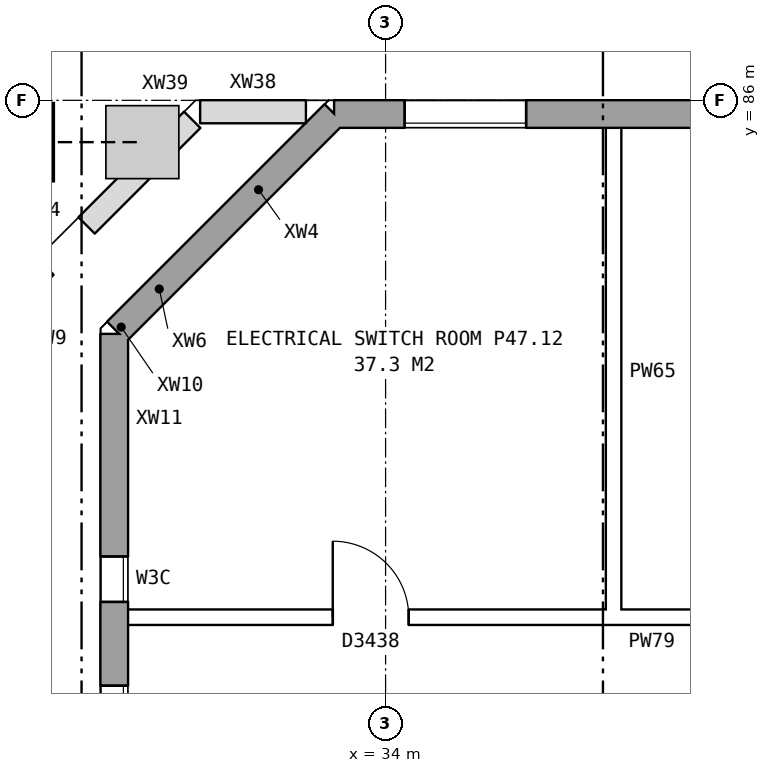
"""IFC4 building model, lengths in metres.
Left out: names, types, materials, properties, quantities, classifications, styles, units other than length and angle.
Written with IfcOpenShell. Run it as: python <this file> out.ifc"""

import sys

from ifc_helpers import new_model, si_unit, direction, frame, frame_2d, origin, origin_2d, place, context, subcontext, project, spatial, rectangle, hollow_rectangle, extrude, element, fill, save


model = new_model("IFC4")
c1 = context("Model", 3, precision=1e-05, world=origin(), true_north=direction((0.0, 1.0)))
c2 = subcontext(c1, "Body", "Model", "MODEL_VIEW")
j1 = project(units=[si_unit("LENGTHUNIT", "METRE"), si_unit("PLANEANGLEUNIT", "RADIAN")], contexts=[c1])
p1 = place(None, origin())
s1 = spatial("IfcSite", under=j1, at=p1, CompositionType="ELEMENT")
p2 = place(p1, origin())
s2 = spatial("IfcBuilding", under=s1, at=p2, CompositionType="ELEMENT")
p3 = place(p2, frame((0.0, 0.0, 167.1)))
s3 = spatial("IfcBuildingStorey", under=s2, at=p3, CompositionType="ELEMENT", Elevation=167.1)
p4 = place(p3, frame((29.121, 85.45, 0.181), z_axis=(0.362422375457, 0.0, 0.932013960071), x_axis=(0.0, 1.0, 0.0)))
e1 = element("IfcColumn", 1, at=p4, inside=s3, PredefinedType="COLUMN", context=c2, shape_type="SweptSolid", body=[
    extrude(hollow_rectangle(XDim=1.0, YDim=1.0, WallThickness=0.055, at=origin_2d()), origin(), (0.0, 0.0, 1.0), 4.439),
])
p5 = place(p3, frame((72.925, 85.82, 0.0), z_axis=(0.0, 0.0, 1.0), x_axis=(-1.0, 0.0, 0.0)))
e2 = element("IfcWall", 2, at=p5, inside=s3, PredefinedType="STANDARD", context=c2, shape_type="SweptSolid", body=[
    extrude(rectangle(XDim=39.601, YDim=0.36, at=frame_2d((19.8, 0.0))), origin(), (0.0, 0.0, 1.0), 4.2),
])
p6 = place(p5, frame((2.25, 0.0, 1.5)))
e3 = element("IfcOpeningElement", 3, at=p6, cuts=e2, PredefinedType="OPENING", context=c2, shape_type="SweptSolid", body=[
    extrude(rectangle(XDim=1.6, YDim=1.2, at=frame_2d((0.8, 0.6))), frame((0.0, 0.19, 0.0), z_axis=(0.0, -1.0, 0.0), x_axis=(1.0, 0.0, 0.0)), (0.0, 0.0, 1.0), 0.38),
])
p7 = place(p5, frame((6.625, 0.0, 1.5)))
e4 = element("IfcOpeningElement", 4, at=p7, cuts=e2, PredefinedType="OPENING", context=c2, shape_type="SweptSolid", body=[
    extrude(rectangle(XDim=1.6, YDim=1.2, at=frame_2d((0.8, 0.6))), frame((0.0, 0.19, 0.0), z_axis=(0.0, -1.0, 0.0), x_axis=(1.0, 0.0, 0.0)), (0.0, 0.0, 1.0), 0.38),
])
p8 = place(p5, frame((9.625, 0.0, 1.5)))
e5 = element("IfcOpeningElement", 5, at=p8, cuts=e2, PredefinedType="OPENING", context=c2, shape_type="SweptSolid", body=[
    extrude(rectangle(XDim=1.6, YDim=1.2, at=frame_2d((0.8, 0.6))), frame((0.0, 0.19, 0.0), z_axis=(0.0, -1.0, 0.0), x_axis=(1.0, 0.0, 0.0)), (0.0, 0.0, 1.0), 0.38),
])
p9 = place(p5, frame((13.875, 0.0, 1.5)))
e6 = element("IfcOpeningElement", 6, at=p9, cuts=e2, PredefinedType="OPENING", context=c2, shape_type="SweptSolid", body=[
    extrude(rectangle(XDim=0.6, YDim=1.2, at=frame_2d((0.3, 0.6))), frame((0.0, 0.19, 0.0), z_axis=(0.0, -1.0, 0.0), x_axis=(1.0, 0.0, 0.0)), (0.0, 0.0, 1.0), 0.38),
])
p10 = place(p5, frame((15.125, 0.0, 1.5)))
e7 = element("IfcOpeningElement", 7, at=p10, cuts=e2, PredefinedType="OPENING", context=c2, shape_type="SweptSolid", body=[
    extrude(rectangle(XDim=0.6, YDim=1.2, at=frame_2d((0.3, 0.6))), frame((0.0, 0.19, 0.0), z_axis=(0.0, -1.0, 0.0), x_axis=(1.0, 0.0, 0.0)), (0.0, 0.0, 1.0), 0.38),
])
p11 = place(p5, frame((18.625, 0.0, 1.5)))
e8 = element("IfcOpeningElement", 8, at=p11, cuts=e2, PredefinedType="OPENING", context=c2, shape_type="SweptSolid", body=[
    extrude(rectangle(XDim=1.6, YDim=1.2, at=frame_2d((0.8, 0.6))), frame((0.0, 0.19, 0.0), z_axis=(0.0, -1.0, 0.0), x_axis=(1.0, 0.0, 0.0)), (0.0, 0.0, 1.0), 0.38),
])
p12 = place(p5, frame((21.625, 0.0, 1.5)))
e9 = element("IfcOpeningElement", 9, at=p12, cuts=e2, PredefinedType="OPENING", context=c2, shape_type="SweptSolid", body=[
    extrude(rectangle(XDim=1.6, YDim=1.2, at=frame_2d((0.8, 0.6))), frame((0.0, 0.19, 0.0), z_axis=(0.0, -1.0, 0.0), x_axis=(1.0, 0.0, 0.0)), (0.0, 0.0, 1.0), 0.38),
])
p13 = place(p5, frame((25.475, 0.0, 1.5)))
e10 = element("IfcOpeningElement", 10, at=p13, cuts=e2, PredefinedType="OPENING", context=c2, shape_type="SweptSolid", body=[
    extrude(rectangle(XDim=1.6, YDim=1.2, at=frame_2d((0.8, 0.6))), frame((0.0, 0.19, 0.0), z_axis=(0.0, -1.0, 0.0), x_axis=(1.0, 0.0, 0.0)), (0.0, 0.0, 1.0), 0.38),
])
p14 = place(p5, frame((30.625, 0.0, 1.5)))
e11 = element("IfcOpeningElement", 11, at=p14, cuts=e2, PredefinedType="OPENING", context=c2, shape_type="SweptSolid", body=[
    extrude(rectangle(XDim=1.6, YDim=1.2, at=frame_2d((0.8, 0.6))), frame((0.0, 0.19, 0.0), z_axis=(0.0, -1.0, 0.0), x_axis=(1.0, 0.0, 0.0)), (0.0, 0.0, 1.0), 0.38),
])
p15 = place(p5, frame((32.525, 0.0, 1.5)))
e12 = element("IfcOpeningElement", 12, at=p15, cuts=e2, PredefinedType="OPENING", context=c2, shape_type="SweptSolid", body=[
    extrude(rectangle(XDim=1.6, YDim=1.2, at=frame_2d((0.8, 0.6))), frame((0.0, 0.19, 0.0), z_axis=(0.0, -1.0, 0.0), x_axis=(1.0, 0.0, 0.0)), (0.0, 0.0, 1.0), 0.38),
])
p16 = place(p5, frame((37.075, 0.0, 1.5)))
e13 = element("IfcOpeningElement", 13, at=p16, cuts=e2, PredefinedType="OPENING", context=c2, shape_type="SweptSolid", body=[
    extrude(rectangle(XDim=1.6, YDim=1.2, at=frame_2d((0.8, 0.6))), frame((0.0, 0.19, 0.0), z_axis=(0.0, -1.0, 0.0), x_axis=(1.0, 0.0, 0.0)), (0.0, 0.0, 1.0), 0.38),
])
p17 = place(p3, frame((33.325, 85.82, 0.0), z_axis=(0.0, 0.0, 1.0), x_axis=(-0.707106781187, -0.707106781187, 0.0)))
e14 = element("IfcWall", 14, at=p17, inside=s3, PredefinedType="STANDARD", context=c2, shape_type="SweptSolid", body=[
    extrude(rectangle(XDim=2.817, YDim=0.36, at=frame_2d((1.409, 0.0))), origin(), (0.0, 0.0, 1.0), 4.2),
])
p18 = place(p3, frame((31.333, 83.828, 0.0), z_axis=(0.0, 0.0, 1.0), x_axis=(-0.707106781187, -0.707106781187, 0.0)))
e15 = element("IfcWall", 15, at=p18, inside=s3, PredefinedType="STANDARD", context=c2, shape_type="SweptSolid", body=[
    extrude(rectangle(XDim=0.878, YDim=0.36, at=frame_2d((0.439, 0.0))), origin(), (0.0, 0.0, 1.0), 3.397),
])
p19 = place(p3, frame((30.712, 83.208, 0.0), z_axis=(0.0, 0.0, 1.0), x_axis=(-0.707106781187, -0.707106781187, 0.0)))
e16 = element("IfcWall", 16, at=p19, inside=s3, PredefinedType="STANDARD", context=c2, shape_type="SweptSolid", body=[
    extrude(rectangle(XDim=0.191, YDim=0.36, at=frame_2d((0.095, 0.0))), origin(), (0.0, 0.0, 1.0), 4.2),
])
p20 = place(p3, frame((30.577, 83.073, 0.953), z_axis=(0.0, 0.0, 1.0), x_axis=(-0.707106781187, -0.707106781187, 0.0)))
e17 = element("IfcWall", 17, at=p20, inside=s3, PredefinedType="STANDARD", context=c2, shape_type="SweptSolid", body=[
    extrude(rectangle(XDim=0.158, YDim=0.36, at=frame_2d((0.079, 0.0))), origin(), (0.0, 0.0, 1.0), 3.247),
])
p21 = place(p3, frame((30.43, 82.925, 0.953), z_axis=(0.0, 0.0, 1.0), x_axis=(0.0, -1.0, 0.0)))
e18 = element("IfcWall", 18, at=p21, inside=s3, PredefinedType="STANDARD", context=c2, shape_type="SweptSolid", body=[
    extrude(rectangle(XDim=1.681, YDim=0.36, at=frame_2d((0.84, 0.0))), origin(), (0.0, 0.0, 1.0), 3.247),
])
p22 = place(p3, frame((30.43, 81.245, 0.0), z_axis=(0.0, 0.0, 1.0), x_axis=(0.0, -1.0, 0.0)))
e19 = element("IfcWall", 19, at=p22, inside=s3, PredefinedType="STANDARD", context=c2, shape_type="SweptSolid", body=[
    extrude(rectangle(XDim=22.489, YDim=0.36, at=frame_2d((11.245, 0.0))), origin(), (0.0, 0.0, 1.0), 4.2),
])
p23 = place(p22, frame((1.245, 0.0, 1.5)))
e20 = element("IfcOpeningElement", 20, at=p23, cuts=e19, PredefinedType="OPENING", context=c2, shape_type="SweptSolid", body=[
    extrude(rectangle(XDim=0.6, YDim=1.2, at=frame_2d((0.3, 0.6))), frame((0.0, 0.19, 0.0), z_axis=(0.0, -1.0, 0.0), x_axis=(1.0, 0.0, 0.0)), (0.0, 0.0, 1.0), 0.38),
])
p24 = place(p22, frame((2.945, 0.0, 1.5)))
e21 = element("IfcOpeningElement", 21, at=p24, cuts=e19, PredefinedType="OPENING", context=c2, shape_type="SweptSolid", body=[
    extrude(rectangle(XDim=1.6, YDim=1.2, at=frame_2d((0.8, 0.6))), frame((0.0, 0.19, 0.0), z_axis=(0.0, -1.0, 0.0), x_axis=(1.0, 0.0, 0.0)), (0.0, 0.0, 1.0), 0.38),
])
p25 = place(p22, frame((7.095, 0.0, 1.5)))
e22 = element("IfcOpeningElement", 22, at=p25, cuts=e19, PredefinedType="OPENING", context=c2, shape_type="SweptSolid", body=[
    extrude(rectangle(XDim=0.6, YDim=1.2, at=frame_2d((0.3, 0.6))), frame((0.0, 0.19, 0.0), z_axis=(0.0, -1.0, 0.0), x_axis=(1.0, 0.0, 0.0)), (0.0, 0.0, 1.0), 0.38),
])
p26 = place(p22, frame((7.995, 0.0, 1.5)))
e23 = element("IfcOpeningElement", 23, at=p26, cuts=e19, PredefinedType="OPENING", context=c2, shape_type="SweptSolid", body=[
    extrude(rectangle(XDim=1.2, YDim=1.2, at=frame_2d((0.6, 0.6))), frame((0.0, 0.19, 0.0), z_axis=(0.0, -1.0, 0.0), x_axis=(1.0, 0.0, 0.0)), (0.0, 0.0, 1.0), 0.38),
])
p27 = place(p22, frame((11.945, 0.0, 1.5)))
e24 = element("IfcOpeningElement", 24, at=p27, cuts=e19, PredefinedType="OPENING", context=c2, shape_type="SweptSolid", body=[
    extrude(rectangle(XDim=1.6, YDim=1.2, at=frame_2d((0.8, 0.6))), frame((0.0, 0.19, 0.0), z_axis=(0.0, -1.0, 0.0), x_axis=(1.0, 0.0, 0.0)), (0.0, 0.0, 1.0), 0.38),
])
p28 = place(p22, frame((14.945, 0.0, 1.5)))
e25 = element("IfcOpeningElement", 25, at=p28, cuts=e19, PredefinedType="OPENING", context=c2, shape_type="SweptSolid", body=[
    extrude(rectangle(XDim=1.6, YDim=1.2, at=frame_2d((0.8, 0.6))), frame((0.0, 0.19, 0.0), z_axis=(0.0, -1.0, 0.0), x_axis=(1.0, 0.0, 0.0)), (0.0, 0.0, 1.0), 0.38),
])
p29 = place(p22, frame((13.845, 0.0, 1.5)))
e26 = element("IfcOpeningElement", 26, at=p29, cuts=e19, PredefinedType="OPENING", context=c2, shape_type="SweptSolid", body=[
    extrude(rectangle(XDim=0.6, YDim=1.2, at=frame_2d((0.3, 0.6))), frame((0.0, 0.19, 0.0), z_axis=(0.0, -1.0, 0.0), x_axis=(1.0, 0.0, 0.0)), (0.0, 0.0, 1.0), 0.38),
])
p30 = place(p22, frame((20.645, 0.0, 1.5)))
e27 = element("IfcOpeningElement", 27, at=p30, cuts=e19, PredefinedType="OPENING", context=c2, shape_type="SweptSolid", body=[
    extrude(rectangle(XDim=0.6, YDim=1.2, at=frame_2d((0.3, 0.6))), frame((0.0, 0.19, 0.0), z_axis=(0.0, -1.0, 0.0), x_axis=(1.0, 0.0, 0.0)), (0.0, 0.0, 1.0), 0.38),
])
p31 = place(p22, frame((16.845, 0.0, 1.5)))
e28 = element("IfcOpeningElement", 28, at=p31, cuts=e19, PredefinedType="OPENING", context=c2, shape_type="SweptSolid", body=[
    extrude(rectangle(XDim=0.6, YDim=1.2, at=frame_2d((0.3, 0.6))), frame((0.0, 0.19, 0.0), z_axis=(0.0, -1.0, 0.0), x_axis=(1.0, 0.0, 0.0)), (0.0, 0.0, 1.0), 0.38),
])
p32 = place(p22, frame((19.445, 0.0, 1.5)))
e29 = element("IfcOpeningElement", 29, at=p32, cuts=e19, PredefinedType="OPENING", context=c2, shape_type="SweptSolid", body=[
    extrude(rectangle(XDim=0.6, YDim=1.2, at=frame_2d((0.3, 0.6))), frame((0.0, 0.19, 0.0), z_axis=(0.0, -1.0, 0.0), x_axis=(1.0, 0.0, 0.0)), (0.0, 0.0, 1.0), 0.38),
])
p33 = place(p3, frame((32.95, 85.85, 0.0), z_axis=(0.0, 0.0, 1.0), x_axis=(-1.0, 0.0, 0.0)))
e30 = element("IfcWall", 30, at=p33, inside=s3, PredefinedType="PARAPET", context=c2, shape_type="SweptSolid", body=[
    extrude(rectangle(XDim=1.388, YDim=0.3, at=frame_2d((0.694, 0.0))), origin(), (0.0, 0.0, 1.0), 1.1),
])
p34 = place(p3, frame((31.455, 85.742, 0.0), z_axis=(0.0, 0.0, 1.0), x_axis=(-0.707169018284, -0.707044538611, 0.0)))
e31 = element("IfcWall", 31, at=p34, inside=s3, PredefinedType="PARAPET", context=c2, shape_type="SweptSolid", body=[
    extrude(rectangle(XDim=1.961, YDim=0.3, at=frame_2d((0.98, 0.0))), origin(), (0.0, 0.0, 1.0), 1.1),
])
p35 = place(p3, frame((29.523, 83.811, 0.0), z_axis=(0.0, 0.0, 1.0), x_axis=(-0.707205601223, -0.707007947338, 0.0)))
e32 = element("IfcWall", 32, at=p35, inside=s3, PredefinedType="PARAPET", context=c2, shape_type="SweptSolid", body=[
    extrude(rectangle(XDim=1.235, YDim=0.3, at=frame_2d((0.618, 0.0))), origin(), (0.0, 0.0, 1.0), 1.1),
])
p36 = place(p3, frame((30.49, 79.2, 0.0), z_axis=(0.0, 0.0, 1.0), x_axis=(1.0, 0.0, 0.0)))
e33 = element("IfcWall", 33, at=p36, inside=s3, PredefinedType="PARTITIONING", context=c2, shape_type="SweptSolid", body=[
    extrude(rectangle(XDim=13.97, YDim=0.2, at=frame_2d((6.985, 0.0))), origin(), (0.0, 0.0, 1.0), 4.2),
])
p37 = place(p36, frame((2.815, 0.0, 0.0)))
e34 = element("IfcOpeningElement", 34, at=p37, cuts=e33, PredefinedType="OPENING", context=c2, shape_type="SweptSolid", body=[
    extrude(rectangle(XDim=1.0, YDim=2.1, at=frame_2d((0.5, 1.05))), frame((0.0, 0.11, 0.0), z_axis=(0.0, -1.0, 0.0), x_axis=(1.0, 0.0, 0.0)), (0.0, 0.0, 1.0), 0.22),
])
p38 = place(p36, frame((10.21, 0.0, 0.0)))
e35 = element("IfcOpeningElement", 35, at=p38, cuts=e33, PredefinedType="OPENING", context=c2, shape_type="SweptSolid", body=[
    extrude(rectangle(XDim=1.0, YDim=2.1, at=frame_2d((0.5, 1.05))), frame((0.0, 0.11, 0.0), z_axis=(0.0, -1.0, 0.0), x_axis=(1.0, 0.0, 0.0)), (0.0, 0.0, 1.0), 0.22),
])
p39 = place(p3, frame((37.0, 79.1, 0.0), z_axis=(0.0, 0.0, 1.0), x_axis=(0.0, 1.0, 0.0)))
e36 = element("IfcWall", 36, at=p39, inside=s3, PredefinedType="PARTITIONING", context=c2, shape_type="SweptSolid", body=[
    extrude(rectangle(XDim=6.66, YDim=0.2, at=frame_2d((3.33, 0.0))), origin(), (0.0, 0.0, 1.0), 4.2),
])
p40 = place(p16, origin())
e37 = element("IfcWindow", 37, at=p40, inside=s3, PartitioningType="DOUBLE_PANEL_HORIZONTAL", PredefinedType="WINDOW", context=c2, shape_type="SweptSolid", body=[
    extrude(rectangle(XDim=1.6, YDim=1.2, at=frame_2d((0.8, 0.6))), frame((0.0, 0.15, 0.0), z_axis=(0.0, -1.0, 0.0), x_axis=(1.0, 0.0, 0.0)), (0.0, 0.0, 1.0), 0.06),
])
fill(e13, e37)
p41 = place(p23, origin())
e38 = element("IfcWindow", 38, at=p41, inside=s3, PartitioningType="DOUBLE_PANEL_HORIZONTAL", PredefinedType="WINDOW", context=c2, shape_type="SweptSolid", body=[
    extrude(rectangle(XDim=0.6, YDim=1.2, at=frame_2d((0.3, 0.6))), frame((0.0, 0.15, 0.0), z_axis=(0.0, -1.0, 0.0), x_axis=(1.0, 0.0, 0.0)), (0.0, 0.0, 1.0), 0.06),
])
fill(e20, e38)
p42 = place(p24, origin())
e39 = element("IfcWindow", 39, at=p42, inside=s3, PartitioningType="DOUBLE_PANEL_HORIZONTAL", PredefinedType="WINDOW", context=c2, shape_type="SweptSolid", body=[
    extrude(rectangle(XDim=1.6, YDim=1.2, at=frame_2d((0.8, 0.6))), frame((0.0, 0.15, 0.0), z_axis=(0.0, -1.0, 0.0), x_axis=(1.0, 0.0, 0.0)), (0.0, 0.0, 1.0), 0.06),
])
fill(e21, e39)
p43 = place(p37, origin())
e40 = element("IfcDoor", 40, at=p43, inside=s3, OperationType="SINGLE_SWING_LEFT", PredefinedType="DOOR", context=c2, shape_type="SweptSolid", body=[
    extrude(rectangle(XDim=1.0, YDim=2.1, at=frame_2d((0.5, 1.05))), frame((0.0, 0.025, 0.0), z_axis=(0.0, -1.0, 0.0), x_axis=(1.0, 0.0, 0.0)), (0.0, 0.0, 1.0), 0.05),
])
fill(e34, e40)
save(model, sys.argv[1])
